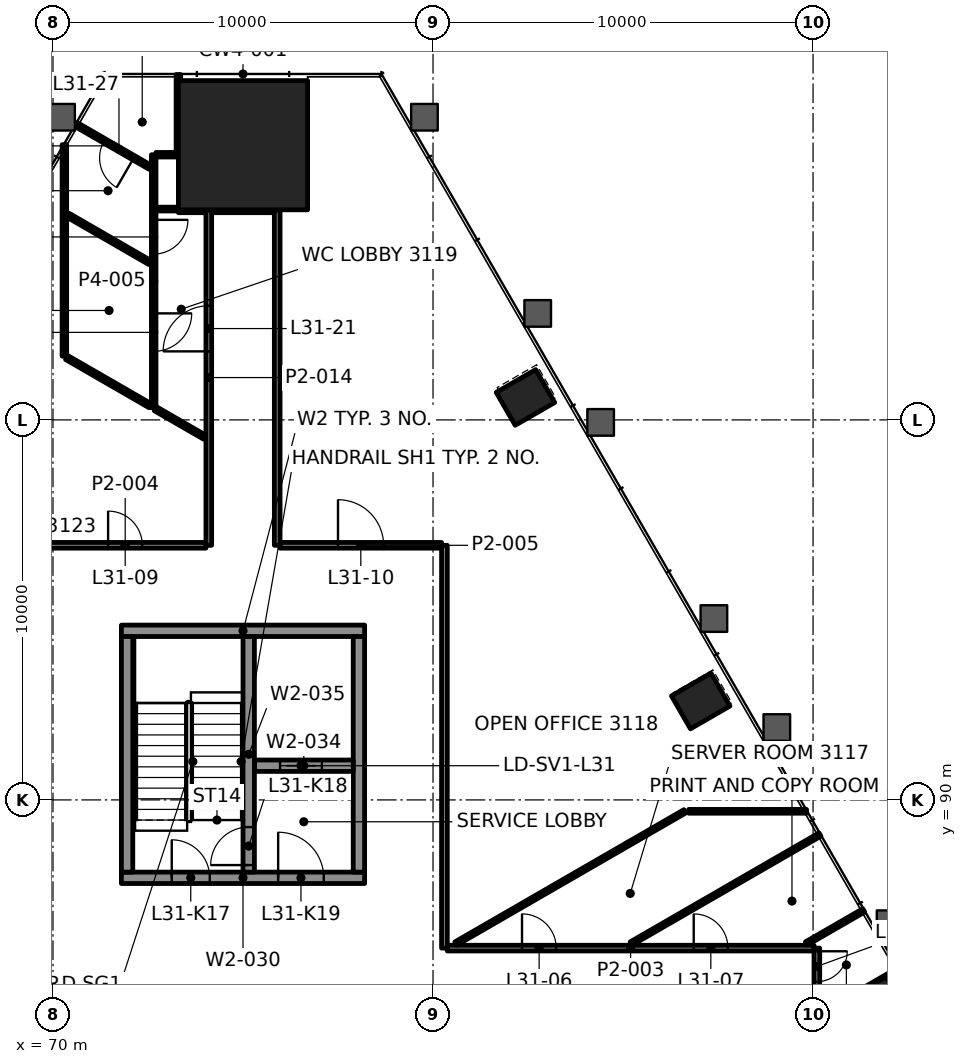
"""IFC4 building model, lengths in metres.
Left out: names, types, materials, properties, quantities, classifications, styles, units other than length and angle.
Written with IfcOpenShell. Run it as: python <this file> out.ifc"""

import sys

from ifc_helpers import new_model, si_unit, direction, frame, frame_2d, origin, origin_2d, place, context, subcontext, project, spatial, rectangle, extrude, element, fill, save


model = new_model("IFC4")
c1 = context("Model", 3, precision=1e-05, world=origin(), true_north=direction((0.0, 1.0)))
c2 = subcontext(c1, "Body", "Model", "MODEL_VIEW")
j1 = project(units=[si_unit("LENGTHUNIT", "METRE"), si_unit("PLANEANGLEUNIT", "RADIAN")], contexts=[c1])
p1 = place(None, origin())
s1 = spatial("IfcSite", under=j1, at=p1, CompositionType="ELEMENT")
p2 = place(p1, origin())
s2 = spatial("IfcBuilding", under=s1, at=p2, CompositionType="ELEMENT")
p3 = place(p2, frame((0.0, 0.0, 136.6)))
s3 = spatial("IfcBuildingStorey", under=s2, at=p3, CompositionType="ELEMENT", Elevation=136.6)
p4 = place(p3, frame((75.0, 107.228, 0.0), z_axis=(0.0, 0.0, 1.0), x_axis=(-1.0, 0.0, 0.0)))
e1 = element("IfcColumn", 1, at=p4, inside=s3, PredefinedType="COLUMN", context=c2, shape_type="SweptSolid", body=[
    extrude(rectangle(XDim=3.4, YDim=3.4, at=origin_2d()), origin(), (0.0, 0.0, 1.0), 4.2),
])
for number, where, z_axis, x_axis in (
    (2, (91.655, 84.616, -0.0), (0.0, 0.0, 1.0), (-0.5, 0.866, 0.0)),
    (3, (87.044, 92.603, -0.0), (0.0, 0.0, 1.0), (-0.5, 0.866, 0.0)),
    (4, (82.432, 100.591, -0.0), (0.0, 0.0, 1.0), (-0.5, 0.866, 0.0)),
):
    element("IfcColumn", number, at=place(p3, frame(where, z_axis=z_axis, x_axis=x_axis)), inside=s3, PredefinedType="COLUMN", context=c2, shape_type="SweptSolid", body=[
        extrude(rectangle(XDim=1.0, YDim=1.2, at=origin_2d()), origin(), (0.0, 0.0, 1.0), 4.2),
    ])
p5 = place(p3, frame((71.8, 87.95, 0.0), z_axis=(0.0, 0.0, 1.0), x_axis=(1.0, 0.0, 0.0)))
e5 = element("IfcWall", 5, at=p5, inside=s3, PredefinedType="SHEAR", context=c2, shape_type="SweptSolid", body=[
    extrude(rectangle(XDim=6.4, YDim=0.3, at=frame_2d((3.2, 0.0))), origin(), (0.0, 0.0, 1.0), 3.9),
])
p6 = place(p5, frame((1.325, 0.0, 0.0)))
e6 = element("IfcOpeningElement", 6, at=p6, cuts=e5, PredefinedType="OPENING", context=c2, shape_type="SweptSolid", body=[
    extrude(rectangle(XDim=1.0, YDim=2.1, at=frame_2d((0.5, 1.05))), frame((0.0, 0.16, 0.0), z_axis=(0.0, -1.0, 0.0), x_axis=(1.0, 0.0, 0.0)), (0.0, 0.0, 1.0), 0.32),
])
p7 = place(p5, frame((4.125, 0.0, 0.0)))
e7 = element("IfcOpeningElement", 7, at=p7, cuts=e5, PredefinedType="OPENING", context=c2, shape_type="SweptSolid", body=[
    extrude(rectangle(XDim=1.2, YDim=2.1, at=frame_2d((0.6, 1.05))), frame((0.0, 0.16, 0.0), z_axis=(0.0, -1.0, 0.0), x_axis=(1.0, 0.0, 0.0)), (0.0, 0.0, 1.0), 0.32),
])
p8 = place(p3, frame((71.8, 94.45, 0.0), z_axis=(0.0, 0.0, 1.0), x_axis=(1.0, 0.0, 0.0)))
e8 = element("IfcWall", 8, at=p8, inside=s3, PredefinedType="SHEAR", context=c2, shape_type="SweptSolid", body=[
    extrude(rectangle(XDim=6.4, YDim=0.3, at=frame_2d((3.2, 0.0))), origin(), (0.0, 0.0, 1.0), 3.9),
])
for number, where, z_axis, x_axis in (
    (9, (71.95, 88.1, 0.0), (0.0, 0.0, 1.0), (0.0, 1.0, 0.0)),
    (10, (78.05, 88.1, 0.0), (0.0, 0.0, 1.0), (0.0, 1.0, 0.0)),
):
    element("IfcWall", number, at=place(p3, frame(where, z_axis=z_axis, x_axis=x_axis)), inside=s3, PredefinedType="SHEAR", context=c2, shape_type="SweptSolid", body=[
        extrude(rectangle(XDim=6.2, YDim=0.3, at=frame_2d((3.1, 0.0))), origin(), (0.0, 0.0, 1.0), 3.9),
    ])
p9 = place(p3, frame((75.3, 90.9, 0.0), z_axis=(0.0, 0.0, 1.0), x_axis=(1.0, 0.0, 0.0)))
e11 = element("IfcWall", 11, at=p9, inside=s3, PredefinedType="SHEAR", context=c2, shape_type="SweptSolid", body=[
    extrude(rectangle(XDim=2.6, YDim=0.3, at=frame_2d((1.3, 0.0))), origin(), (0.0, 0.0, 1.0), 3.9),
])
p10 = place(p9, frame((0.675, 0.0, 0.0)))
e12 = element("IfcOpeningElement", 12, at=p10, cuts=e11, PredefinedType="OPENING", context=c2, shape_type="SweptSolid", body=[
    extrude(rectangle(XDim=1.1, YDim=2.1, at=frame_2d((0.55, 1.05))), frame((0.0, 0.16, 0.0), z_axis=(0.0, -1.0, 0.0), x_axis=(1.0, 0.0, 0.0)), (0.0, 0.0, 1.0), 0.32),
])
p11 = place(p3, frame((75.15, 88.1, 0.0), z_axis=(0.0, 0.0, 1.0), x_axis=(0.0, 1.0, 0.0)))
e13 = element("IfcWall", 13, at=p11, inside=s3, PredefinedType="SHEAR", context=c2, shape_type="SweptSolid", body=[
    extrude(rectangle(XDim=6.2, YDim=0.3, at=frame_2d((3.1, 0.0))), origin(), (0.0, 0.0, 1.0), 3.9),
])
p12 = place(p11, frame((0.185, 0.0, 0.0)))
e14 = element("IfcOpeningElement", 14, at=p12, cuts=e13, PredefinedType="OPENING", context=c2, shape_type="SweptSolid", body=[
    extrude(rectangle(XDim=1.0, YDim=2.1, at=frame_2d((0.5, 1.05))), frame((0.0, 0.16, 0.0), z_axis=(0.0, -1.0, 0.0), x_axis=(1.0, 0.0, 0.0)), (0.0, 0.0, 1.0), 0.32),
])
p13 = place(p3, frame((80.375, 86.1, 0.0), z_axis=(0.0, 0.0, 1.0), x_axis=(1.0, 0.0, 0.0)))
e15 = element("IfcWall", 15, at=p13, inside=s3, PredefinedType="PARTITIONING", context=c2, shape_type="SweptSolid", body=[
    extrude(rectangle(XDim=9.65, YDim=0.15, at=frame_2d((4.825, 0.0))), origin(), (0.0, 0.0, 1.0), 3.3),
])
p14 = place(p13, frame((1.967, 0.0, 0.0)))
e16 = element("IfcOpeningElement", 16, at=p14, cuts=e15, PredefinedType="OPENING", context=c2, shape_type="SweptSolid", body=[
    extrude(rectangle(XDim=0.9, YDim=2.1, at=frame_2d((0.45, 1.05))), frame((0.0, 0.085, 0.0), z_axis=(0.0, -1.0, 0.0), x_axis=(1.0, 0.0, 0.0)), (0.0, 0.0, 1.0), 0.17),
])
p15 = place(p13, frame((6.485, 0.0, 0.0)))
e17 = element("IfcOpeningElement", 17, at=p15, cuts=e15, PredefinedType="OPENING", context=c2, shape_type="SweptSolid", body=[
    extrude(rectangle(XDim=0.9, YDim=2.1, at=frame_2d((0.45, 1.05))), frame((0.0, 0.085, 0.0), z_axis=(0.0, -1.0, 0.0), x_axis=(1.0, 0.0, 0.0)), (0.0, 0.0, 1.0), 0.17),
])
p16 = place(p3, frame((86.728, 89.7, 0.0), z_axis=(0.0, 0.0, 1.0), x_axis=(1.0, 0.0, 0.0)))
e18 = element("IfcWall", 18, at=p16, inside=s3, PredefinedType="PARTITIONING", context=c2, shape_type="SweptSolid", body=[
    extrude(rectangle(XDim=3.1, YDim=0.1, at=frame_2d((1.55, 0.0))), origin(), (0.0, 0.0, 1.0), 3.065),
])
p17 = place(p3, frame((69.775, 96.7, 0.0), z_axis=(0.0, 0.0, 1.0), x_axis=(1.0, 0.0, 0.0)))
e19 = element("IfcWall", 19, at=p17, inside=s3, PredefinedType="PARTITIONING", context=c2, shape_type="SweptSolid", body=[
    extrude(rectangle(XDim=4.25, YDim=0.15, at=frame_2d((2.125, 0.0))), origin(), (0.0, 0.0, 1.0), 3.3),
])
p18 = place(p17, frame((1.675, 0.0, 0.0)))
e20 = element("IfcOpeningElement", 20, at=p18, cuts=e19, PredefinedType="OPENING", context=c2, shape_type="SweptSolid", body=[
    extrude(rectangle(XDim=0.9, YDim=2.1, at=frame_2d((0.45, 1.05))), frame((0.0, 0.085, 0.0), z_axis=(0.0, -1.0, 0.0), x_axis=(1.0, 0.0, 0.0)), (0.0, 0.0, 1.0), 0.17),
])
p19 = place(p3, frame((75.975, 96.7, 0.0), z_axis=(0.0, 0.0, 1.0), x_axis=(1.0, 0.0, 0.0)))
e21 = element("IfcWall", 21, at=p19, inside=s3, PredefinedType="PARTITIONING", context=c2, shape_type="SweptSolid", body=[
    extrude(rectangle(XDim=4.249, YDim=0.15, at=frame_2d((2.125, 0.0))), origin(), (0.0, 0.0, 1.0), 3.3),
])
p20 = place(p19, frame((1.525, 0.0, 0.0)))
e22 = element("IfcOpeningElement", 22, at=p20, cuts=e21, PredefinedType="OPENING", context=c2, shape_type="SweptSolid", body=[
    extrude(rectangle(XDim=1.2, YDim=2.1, at=frame_2d((0.6, 1.05))), frame((0.0, 0.085, 0.0), z_axis=(0.0, -1.0, 0.0), x_axis=(1.0, 0.0, 0.0)), (0.0, 0.0, 1.0), 0.17),
])
p21 = place(p3, frame((73.301, 105.528, 0.0), z_axis=(0.0, 0.0, 1.0), x_axis=(1.0, 0.0, 0.0)))
e23 = element("IfcWall", 23, at=p21, inside=s3, PredefinedType="PARTITIONING", context=c2, shape_type="SweptSolid", body=[
    extrude(rectangle(XDim=0.724, YDim=0.15, at=frame_2d((0.362, 0.0))), origin(), (0.0, 0.0, 1.0), 3.3),
])
p22 = place(p3, frame((72.71, 105.548, 0.0), z_axis=(0.0, 0.0, 1.0), x_axis=(1.0, 0.0, 0.0)))
e24 = element("IfcWall", 24, at=p22, inside=s3, PredefinedType="PARTITIONING", context=c2, shape_type="SweptSolid", body=[
    extrude(rectangle(XDim=0.59, YDim=0.1, at=frame_2d((0.295, 0.0))), origin(), (0.0, 0.0, 1.0), 3.3),
])
p23 = place(p3, frame((72.71, 106.978, 0.0), z_axis=(0.0, 0.0, 1.0), x_axis=(1.0, 0.0, 0.0)))
e25 = element("IfcWall", 25, at=p23, inside=s3, PredefinedType="PARTITIONING", context=c2, shape_type="SweptSolid", body=[
    extrude(rectangle(XDim=0.53, YDim=0.12, at=frame_2d((0.265, 0.0))), origin(), (0.0, 0.0, 1.0), 3.3),
])
p24 = place(p3, frame((90.885, 84.749, 0.0), z_axis=(0.0, 0.0, 1.0), x_axis=(0.866029224906, 0.499993381564, 0.0)))
e26 = element("IfcWall", 26, at=p24, inside=s3, PredefinedType="PARTITIONING", context=c2, shape_type="SweptSolid", body=[
    extrude(rectangle(XDim=1.56, YDim=0.1, at=frame_2d((0.78, 0.0))), origin(), (0.0, 0.0, 1.0), 3.065),
])
p25 = place(p3, frame((89.822, 86.22, 0.0), z_axis=(0.0, 0.0, 1.0), x_axis=(0.866022549299, 0.50000494408, 0.0)))
e27 = element("IfcWall", 27, at=p25, inside=s3, PredefinedType="PARTITIONING", context=c2, shape_type="SweptSolid", body=[
    extrude(rectangle(XDim=1.746, YDim=0.1, at=frame_2d((0.873, 0.0))), origin(), (0.0, 0.0, 1.0), 3.065),
])
p26 = place(p3, frame((85.211, 86.219, 0.0), z_axis=(0.0, 0.0, 1.0), x_axis=(0.866012033619, 0.50002315709, 0.0)))
e28 = element("IfcWall", 28, at=p26, inside=s3, PredefinedType="PARTITIONING", context=c2, shape_type="SweptSolid", body=[
    extrude(rectangle(XDim=5.74, YDim=0.1, at=frame_2d((2.87, 0.0))), origin(), (0.0, 0.0, 1.0), 3.065),
])
p27 = place(p3, frame((80.599, 86.22, 0.0), z_axis=(0.0, 0.0, 1.0), x_axis=(0.866015615191, 0.500016953958, 0.0)))
e29 = element("IfcWall", 29, at=p27, inside=s3, PredefinedType="PARTITIONING", context=c2, shape_type="SweptSolid", body=[
    extrude(rectangle(XDim=6.961, YDim=0.1, at=frame_2d((3.48, 0.0))), origin(), (0.0, 0.0, 1.0), 3.3),
])
p28 = place(p3, frame((90.1, 86.1, 0.0), z_axis=(0.0, 0.0, 1.0), x_axis=(0.0, -1.0, 0.0)))
e30 = element("IfcWall", 30, at=p28, inside=s3, PredefinedType="PARTITIONING", context=c2, shape_type="SweptSolid", body=[
    extrude(rectangle(XDim=18.779, YDim=0.15, at=frame_2d((9.389, 0.0))), origin(), (0.0, 0.0, 1.0), 3.3),
])
p29 = place(p28, frame((0.083, 0.0, 0.0)))
e31 = element("IfcOpeningElement", 31, at=p29, cuts=e30, PredefinedType="OPENING", context=c2, shape_type="SweptSolid", body=[
    extrude(rectangle(XDim=0.8, YDim=2.1, at=frame_2d((0.4, 1.05))), frame((0.0, 0.085, 0.0), z_axis=(0.0, -1.0, 0.0), x_axis=(1.0, 0.0, 0.0)), (0.0, 0.0, 1.0), 0.17),
])
p30 = place(p28, frame((8.588, 0.0, 0.0)))
e32 = element("IfcOpeningElement", 32, at=p30, cuts=e30, PredefinedType="OPENING", context=c2, shape_type="SweptSolid", body=[
    extrude(rectangle(XDim=0.9, YDim=2.1, at=frame_2d((0.45, 1.05))), frame((0.0, 0.085, 0.0), z_axis=(0.0, -1.0, 0.0), x_axis=(1.0, 0.0, 0.0)), (0.0, 0.0, 1.0), 0.17),
])
p31 = place(p28, frame((16.635, 0.0, 0.0)))
e33 = element("IfcOpeningElement", 33, at=p31, cuts=e30, PredefinedType="OPENING", context=c2, shape_type="SweptSolid", body=[
    extrude(rectangle(XDim=1.0, YDim=2.1, at=frame_2d((0.5, 1.05))), frame((0.0, 0.085, 0.0), z_axis=(0.0, -1.0, 0.0), x_axis=(1.0, 0.0, 0.0)), (0.0, 0.0, 1.0), 0.17),
])
p32 = place(p3, frame((80.3, 86.1, 0.0), z_axis=(0.0, 0.0, 1.0), x_axis=(0.0, 1.0, 0.0)))
e34 = element("IfcWall", 34, at=p32, inside=s3, PredefinedType="PARTITIONING", context=c2, shape_type="SweptSolid", body=[
    extrude(rectangle(XDim=10.599, YDim=0.15, at=frame_2d((5.3, 0.0))), origin(), (0.0, 0.0, 1.0), 3.222),
])
p33 = place(p3, frame((75.9, 96.7, 0.0), z_axis=(0.0, 0.0, 1.0), x_axis=(0.0, 1.0, 0.0)))
e35 = element("IfcWall", 35, at=p33, inside=s3, PredefinedType="PARTITIONING", context=c2, shape_type="SweptSolid", body=[
    extrude(rectangle(XDim=8.828, YDim=0.15, at=frame_2d((4.414, 0.0))), origin(), (0.0, 0.0, 1.0), 3.3),
])
p34 = place(p3, frame((74.1, 96.7, 0.0), z_axis=(0.0, 0.0, 1.0), x_axis=(0.0, 1.0, 0.0)))
e36 = element("IfcWall", 36, at=p34, inside=s3, PredefinedType="PARTITIONING", context=c2, shape_type="SweptSolid", body=[
    extrude(rectangle(XDim=8.828, YDim=0.15, at=frame_2d((4.414, 0.0))), origin(), (0.0, 0.0, 1.0), 3.3),
])
p35 = place(p34, frame((5.104, 0.0, 0.0)))
e37 = element("IfcOpeningElement", 37, at=p35, cuts=e36, PredefinedType="OPENING", context=c2, shape_type="SweptSolid", body=[
    extrude(rectangle(XDim=1.2, YDim=2.1, at=frame_2d((0.6, 1.05))), frame((0.0, 0.085, 0.0), z_axis=(0.0, -1.0, 0.0), x_axis=(1.0, 0.0, 0.0)), (0.0, 0.0, 1.0), 0.17),
])
p36 = place(p3, frame((73.3, 106.978, 0.0), z_axis=(0.0, 0.0, 1.0), x_axis=(0.0, 1.0, 0.0)))
e38 = element("IfcWall", 38, at=p36, inside=s3, PredefinedType="PARTITIONING", context=c2, shape_type="SweptSolid", body=[
    extrude(rectangle(XDim=2.11, YDim=0.12, at=frame_2d((1.055, 0.0))), origin(), (0.0, 0.0, 1.0), 3.3),
])
p37 = place(p3, frame((72.65, 106.978, 0.0), z_axis=(0.0, 0.0, 1.0), x_axis=(0.0, -1.0, 0.0)))
e39 = element("IfcWall", 39, at=p37, inside=s3, PredefinedType="PARTITIONING", context=c2, shape_type="SweptSolid", body=[
    extrude(rectangle(XDim=6.659, YDim=0.12, at=frame_2d((3.33, 0.0))), origin(), (0.0, 0.0, 1.0), 3.3),
])
p38 = place(p37, frame((1.714, 0.0, 0.0)))
e40 = element("IfcOpeningElement", 40, at=p38, cuts=e39, PredefinedType="OPENING", context=c2, shape_type="SweptSolid", body=[
    extrude(rectangle(XDim=0.9, YDim=2.1, at=frame_2d((0.45, 1.05))), frame((0.0, 0.07, 0.0), z_axis=(0.0, -1.0, 0.0), x_axis=(1.0, 0.0, 0.0)), (0.0, 0.0, 1.0), 0.14),
])
p39 = place(p37, frame((4.175, 0.0, 0.0)))
e41 = element("IfcOpeningElement", 41, at=p39, cuts=e39, PredefinedType="OPENING", context=c2, shape_type="SweptSolid", body=[
    extrude(rectangle(XDim=1.0, YDim=2.1, at=frame_2d((0.5, 1.05))), frame((0.0, 0.07, 0.0), z_axis=(0.0, -1.0, 0.0), x_axis=(1.0, 0.0, 0.0)), (0.0, 0.0, 1.0), 0.14),
])
p40 = place(p3, frame((70.3, 101.677, 0.0), z_axis=(0.0, 0.0, 1.0), x_axis=(0.0, 1.0, 0.0)))
e42 = element("IfcWall", 42, at=p40, inside=s3, PredefinedType="PARTITIONING", context=c2, shape_type="SweptSolid", body=[
    extrude(rectangle(XDim=5.566, YDim=0.12, at=frame_2d((2.783, 0.0))), origin(), (0.0, 0.0, 1.0), 3.3),
])
p41 = place(p3, frame((72.555, 106.648, 0.0), z_axis=(0.0, 0.0, 1.0), x_axis=(-0.866024802457, 0.500001041529, 0.0)))
e43 = element("IfcWall", 43, at=p41, inside=s3, PredefinedType="PARTITIONING", context=c2, shape_type="SweptSolid", body=[
    extrude(rectangle(XDim=2.25, YDim=0.12, at=frame_2d((1.125, 0.0))), origin(), (0.0, 0.0, 1.0), 3.3),
])
p42 = place(p41, frame((0.495, 0.0, 0.0)))
e44 = element("IfcOpeningElement", 44, at=p42, cuts=e43, PredefinedType="OPENING", context=c2, shape_type="SweptSolid", body=[
    extrude(rectangle(XDim=0.9, YDim=2.1, at=frame_2d((0.45, 1.05))), frame((0.0, 0.07, 0.0), z_axis=(0.0, -1.0, 0.0), x_axis=(1.0, 0.0, 0.0)), (0.0, 0.0, 1.0), 0.14),
])
p43 = place(p3, frame((72.555, 104.138, 0.0), z_axis=(0.0, 0.0, 1.0), x_axis=(-0.866006330792, 0.500033033937, 0.0)))
e45 = element("IfcWall", 45, at=p43, inside=s3, PredefinedType="PARTITIONING", context=c2, shape_type="SweptSolid", body=[
    extrude(rectangle(XDim=2.495, YDim=0.12, at=frame_2d((1.248, 0.0))), origin(), (0.0, 0.0, 1.0), 3.3),
])
p44 = place(p3, frame((73.99, 99.545, 0.0), z_axis=(0.0, 0.0, 1.0), x_axis=(-0.866055123991, 0.49994851956, 0.0)))
e46 = element("IfcWall", 46, at=p44, inside=s3, PredefinedType="PARTITIONING", context=c2, shape_type="SweptSolid", body=[
    extrude(rectangle(XDim=1.496, YDim=0.12, at=frame_2d((0.748, 0.0))), origin(), (0.0, 0.0, 1.0), 3.3),
])
p45 = place(p3, frame((74.175, 105.528, 0.0), z_axis=(0.0, 0.0, 1.0), x_axis=(1.0, 0.0, 0.0)))
e47 = element("IfcWall", 47, at=p45, inside=s3, PredefinedType="PARTITIONING", context=c2, shape_type="SweptSolid", body=[
    extrude(rectangle(XDim=1.649, YDim=0.15, at=frame_2d((0.825, 0.0))), origin(), (0.0, 0.0, 1.0), 3.297),
])
p46 = place(p3, frame((72.56, 100.371, 0.0), z_axis=(0.0, 0.0, 1.0), x_axis=(-0.866004731956, 0.500035802948, 0.0)))
e48 = element("IfcWall", 48, at=p46, inside=s3, PredefinedType="PARTITIONING", context=c2, shape_type="SweptSolid", body=[
    extrude(rectangle(XDim=2.54, YDim=0.12, at=frame_2d((1.27, 0.0))), origin(), (0.0, 0.0, 1.0), 3.3),
])
p47 = place(p14, origin())
e49 = element("IfcDoor", 49, at=p47, inside=s3, OperationType="SINGLE_SWING_RIGHT", PredefinedType="DOOR", context=c2, shape_type="SweptSolid", body=[
    extrude(rectangle(XDim=0.9, YDim=2.1, at=frame_2d((0.45, 1.05))), frame((0.0, 0.025, 0.0), z_axis=(0.0, -1.0, 0.0), x_axis=(1.0, 0.0, 0.0)), (0.0, 0.0, 1.0), 0.05),
])
fill(e16, e49)
p48 = place(p15, origin())
e50 = element("IfcDoor", 50, at=p48, inside=s3, OperationType="SINGLE_SWING_LEFT", PredefinedType="DOOR", context=c2, shape_type="SweptSolid", body=[
    extrude(rectangle(XDim=0.9, YDim=2.1, at=frame_2d((0.45, 1.05))), frame((0.0, 0.025, 0.0), z_axis=(0.0, -1.0, 0.0), x_axis=(1.0, 0.0, 0.0)), (0.0, 0.0, 1.0), 0.05),
])
fill(e17, e50)
p49 = place(p18, origin())
e51 = element("IfcDoor", 51, at=p49, inside=s3, OperationType="SINGLE_SWING_RIGHT", PredefinedType="DOOR", context=c2, shape_type="SweptSolid", body=[
    extrude(rectangle(XDim=0.9, YDim=2.1, at=frame_2d((0.45, 1.05))), frame((0.0, 0.025, 0.0), z_axis=(0.0, -1.0, 0.0), x_axis=(1.0, 0.0, 0.0)), (0.0, 0.0, 1.0), 0.05),
])
fill(e20, e51)
p50 = place(p20, origin())
e52 = element("IfcDoor", 52, at=p50, inside=s3, OperationType="DOUBLE_DOOR_SINGLE_SWING", PredefinedType="DOOR", context=c2, shape_type="SweptSolid", body=[
    extrude(rectangle(XDim=1.2, YDim=2.1, at=frame_2d((0.6, 1.05))), frame((0.0, 0.025, 0.0), z_axis=(0.0, -1.0, 0.0), x_axis=(1.0, 0.0, 0.0)), (0.0, 0.0, 1.0), 0.05),
])
fill(e22, e52)
p51 = place(p29, origin())
e53 = element("IfcDoor", 53, at=p51, inside=s3, OperationType="SINGLE_SWING_LEFT", PredefinedType="DOOR", context=c2, shape_type="SweptSolid", body=[
    extrude(rectangle(XDim=0.8, YDim=2.1, at=frame_2d((0.4, 1.05))), frame((0.0, 0.025, 0.0), z_axis=(0.0, -1.0, 0.0), x_axis=(1.0, 0.0, 0.0)), (0.0, 0.0, 1.0), 0.05),
])
fill(e31, e53)
p52 = place(p35, origin())
e54 = element("IfcDoor", 54, at=p52, inside=s3, OperationType="DOUBLE_DOOR_SINGLE_SWING", PredefinedType="DOOR", context=c2, shape_type="SweptSolid", body=[
    extrude(rectangle(XDim=1.2, YDim=2.1, at=frame_2d((0.6, 1.05))), frame((0.0, 0.025, 0.0), z_axis=(0.0, -1.0, 0.0), x_axis=(1.0, 0.0, 0.0)), (0.0, 0.0, 1.0), 0.05),
])
fill(e37, e54)
p53 = place(p38, origin())
e55 = element("IfcDoor", 55, at=p53, inside=s3, OperationType="SINGLE_SWING_LEFT", PredefinedType="DOOR", context=c2, shape_type="SweptSolid", body=[
    extrude(rectangle(XDim=0.9, YDim=2.1, at=frame_2d((0.45, 1.05))), frame((0.0, 0.025, 0.0), z_axis=(0.0, -1.0, 0.0), x_axis=(1.0, 0.0, 0.0)), (0.0, 0.0, 1.0), 0.05),
])
fill(e40, e55)
p54 = place(p39, origin())
e56 = element("IfcDoor", 56, at=p54, inside=s3, OperationType="SINGLE_SWING_RIGHT", PredefinedType="DOOR", context=c2, shape_type="SweptSolid", body=[
    extrude(rectangle(XDim=1.0, YDim=2.1, at=frame_2d((0.5, 1.05))), frame((0.0, 0.025, 0.0), z_axis=(0.0, -1.0, 0.0), x_axis=(1.0, 0.0, 0.0)), (0.0, 0.0, 1.0), 0.05),
])
fill(e41, e56)
p55 = place(p42, origin())
e57 = element("IfcDoor", 57, at=p55, inside=s3, OperationType="SINGLE_SWING_LEFT", PredefinedType="DOOR", context=c2, shape_type="SweptSolid", body=[
    extrude(rectangle(XDim=0.9, YDim=2.1, at=frame_2d((0.45, 1.05))), frame((0.0, 0.025, 0.0), z_axis=(0.0, -1.0, 0.0), x_axis=(1.0, 0.0, 0.0)), (0.0, 0.0, 1.0), 0.05),
])
fill(e44, e57)
p56 = place(p10, origin())
e58 = element("IfcDoor", 58, at=p56, inside=s3, OperationType="DOUBLE_DOOR_SLIDING", PredefinedType="DOOR", context=c2, shape_type="SweptSolid", body=[
    extrude(rectangle(XDim=1.1, YDim=2.1, at=frame_2d((0.55, 1.05))), frame((0.0, 0.025, 0.0), z_axis=(0.0, -1.0, 0.0), x_axis=(1.0, 0.0, 0.0)), (0.0, 0.0, 1.0), 0.05),
])
fill(e12, e58)
p57 = place(p6, origin())
e59 = element("IfcDoor", 59, at=p57, inside=s3, OperationType="SINGLE_SWING_RIGHT", PredefinedType="DOOR", context=c2, shape_type="SweptSolid", body=[
    extrude(rectangle(XDim=1.0, YDim=2.1, at=frame_2d((0.5, 1.05))), frame((0.0, 0.025, 0.0), z_axis=(0.0, -1.0, 0.0), x_axis=(1.0, 0.0, 0.0)), (0.0, 0.0, 1.0), 0.05),
])
fill(e6, e59)
p58 = place(p12, origin())
e60 = element("IfcDoor", 60, at=p58, inside=s3, OperationType="SINGLE_SWING_LEFT", PredefinedType="DOOR", context=c2, shape_type="SweptSolid", body=[
    extrude(rectangle(XDim=1.0, YDim=2.1, at=frame_2d((0.5, 1.05))), frame((0.0, 0.025, 0.0), z_axis=(0.0, -1.0, 0.0), x_axis=(1.0, 0.0, 0.0)), (0.0, 0.0, 1.0), 0.05),
])
fill(e14, e60)
p59 = place(p7, origin())
e61 = element("IfcDoor", 61, at=p59, inside=s3, OperationType="SINGLE_SWING_RIGHT", PredefinedType="DOOR", context=c2, shape_type="SweptSolid", body=[
    extrude(rectangle(XDim=1.2, YDim=2.1, at=frame_2d((0.6, 1.05))), frame((0.0, 0.025, 0.0), z_axis=(0.0, -1.0, 0.0), x_axis=(1.0, 0.0, 0.0)), (0.0, 0.0, 1.0), 0.05),
])
fill(e7, e61)
save(model, sys.argv[1])
